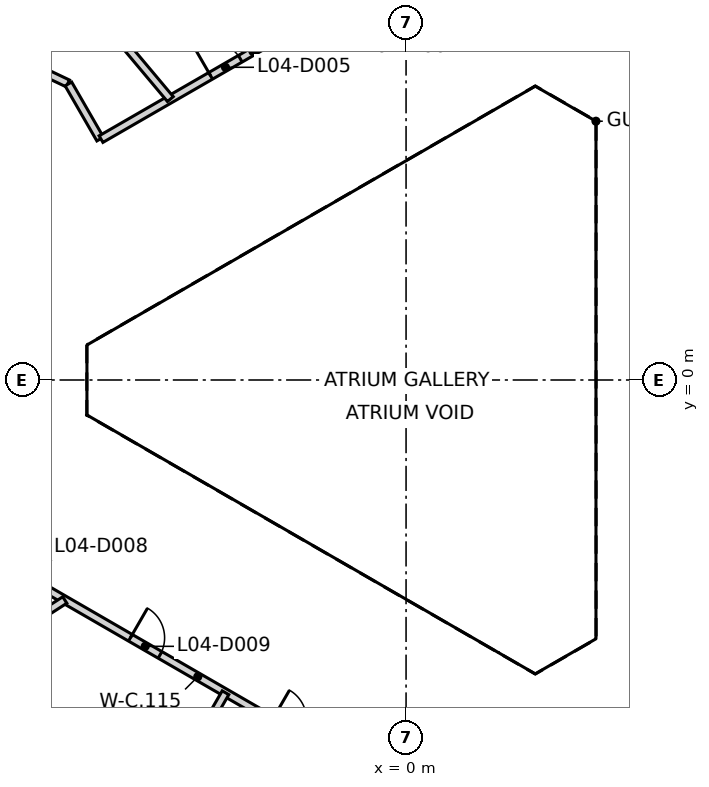
"""IFC4 building model, lengths in metres.
Left out: names, types, materials, properties, quantities, classifications, styles, units other than length and angle.
Written with IfcOpenShell. Run it as: python <this file> out.ifc"""

import sys

from ifc_helpers import new_model, si_unit, direction, frame, frame_2d, origin, place, context, subcontext, project, spatial, rectangle, extrude, element, fill, save


model = new_model("IFC4")
c1 = context("Model", 3, precision=1e-05, world=origin(), true_north=direction((0.0, 1.0)))
c2 = subcontext(c1, "Body", "Model", "MODEL_VIEW")
j1 = project(units=[si_unit("LENGTHUNIT", "METRE"), si_unit("PLANEANGLEUNIT", "RADIAN")], contexts=[c1])
p1 = place(None, origin())
s1 = spatial("IfcSite", under=j1, at=p1, CompositionType="ELEMENT")
p2 = place(p1, origin())
s2 = spatial("IfcBuilding", under=s1, at=p2, CompositionType="ELEMENT")
p3 = place(p2, frame((0.0, 0.0, 24.5)))
s3 = spatial("IfcBuildingStorey", under=s2, at=p3, CompositionType="ELEMENT", Elevation=24.5)
p4 = place(p3, frame((10.42, 6.498, 0.0), z_axis=(0.0, 0.0, 1.0), x_axis=(-0.866021906294, 0.500006057782, 0.0)))
e1 = element("IfcWall", 1, at=p4, inside=s3, PredefinedType="SHEAR", context=c2, shape_type="SweptSolid", body=[
    extrude(rectangle(XDim=11.55, YDim=0.25, at=frame_2d((5.775, 0.0))), origin(), (0.0, 0.0, 1.0), 4.6),
])
p5 = place(p4, frame((10.025, 0.0, 0.0)))
e2 = element("IfcOpeningElement", 2, at=p5, cuts=e1, PredefinedType="OPENING", context=c2, shape_type="SweptSolid", body=[
    extrude(rectangle(XDim=1.2, YDim=2.1, at=frame_2d((0.6, 1.05))), frame((0.0, 0.135, 0.0), z_axis=(0.0, -1.0, 0.0), x_axis=(1.0, 0.0, 0.0)), (0.0, 0.0, 1.0), 0.27),
])
p6 = place(p4, frame((8.725, 0.0, 0.0)))
e3 = element("IfcOpeningElement", 3, at=p6, cuts=e1, PredefinedType="OPENING", context=c2, shape_type="SweptSolid", body=[
    extrude(rectangle(XDim=1.2, YDim=2.1, at=frame_2d((0.6, 1.05))), frame((0.0, 0.135, 0.0), z_axis=(0.0, -1.0, 0.0), x_axis=(1.0, 0.0, 0.0)), (0.0, 0.0, 1.0), 0.27),
])
p7 = place(p3, frame((0.417, -12.273, 0.0), z_axis=(0.0, 0.0, 1.0), x_axis=(0.866021906294, 0.500006057782, 0.0)))
e4 = element("IfcWall", 4, at=p7, inside=s3, PredefinedType="SHEAR", context=c2, shape_type="SweptSolid", body=[
    extrude(rectangle(XDim=11.55, YDim=0.25, at=frame_2d((5.775, 0.0))), origin(), (0.0, 0.0, 1.0), 4.6),
])
p8 = place(p7, frame((10.025, 0.0, 0.0)))
e5 = element("IfcOpeningElement", 5, at=p8, cuts=e4, PredefinedType="OPENING", context=c2, shape_type="SweptSolid", body=[
    extrude(rectangle(XDim=1.2, YDim=2.1, at=frame_2d((0.6, 1.05))), frame((0.0, 0.135, 0.0), z_axis=(0.0, -1.0, 0.0), x_axis=(1.0, 0.0, 0.0)), (0.0, 0.0, 1.0), 0.27),
])
p9 = place(p7, frame((8.725, 0.0, 0.0)))
e6 = element("IfcOpeningElement", 6, at=p9, cuts=e4, PredefinedType="OPENING", context=c2, shape_type="SweptSolid", body=[
    extrude(rectangle(XDim=1.2, YDim=2.1, at=frame_2d((0.6, 1.05))), frame((0.0, 0.135, 0.0), z_axis=(0.0, -1.0, 0.0), x_axis=(1.0, 0.0, 0.0)), (0.0, 0.0, 1.0), 0.27),
])
p10 = place(p3, frame((-10.083, 8.365, 0.0), z_axis=(0.0, 0.0, 1.0), x_axis=(0.903403797446, -0.428790833344, 0.0)))
e7 = element("IfcWall", 7, at=p10, inside=s3, PredefinedType="PARTITIONING", context=c2, shape_type="SweptSolid", body=[
    extrude(rectangle(XDim=1.311, YDim=0.2, at=frame_2d((0.655, 0.0))), origin(), (0.0, 0.0, 1.0), 4.6),
])
p11 = place(p3, frame((-9.463, -5.506, 0.0), z_axis=(0.0, 0.0, 1.0), x_axis=(0.865865073245, -0.500277597875, 0.0)))
e8 = element("IfcWall", 8, at=p11, inside=s3, PredefinedType="PARTITIONING", context=c2, shape_type="SweptSolid", body=[
    extrude(rectangle(XDim=9.199, YDim=0.2, at=frame_2d((4.6, 0.0))), origin(), (0.0, 0.0, 1.0), 4.6),
])
p12 = place(p11, frame((2.552, 0.0, 0.0)))
e9 = element("IfcOpeningElement", 9, at=p12, cuts=e8, PredefinedType="OPENING", context=c2, shape_type="SweptSolid", body=[
    extrude(rectangle(XDim=0.9, YDim=2.1, at=frame_2d((0.45, 1.05))), frame((0.0, 0.11, 0.0), z_axis=(0.0, -1.0, 0.0), x_axis=(1.0, 0.0, 0.0)), (0.0, 0.0, 1.0), 0.22),
])
p13 = place(p11, frame((6.866, 0.0, 0.0)))
e10 = element("IfcOpeningElement", 10, at=p13, cuts=e8, PredefinedType="OPENING", context=c2, shape_type="SweptSolid", body=[
    extrude(rectangle(XDim=0.9, YDim=2.1, at=frame_2d((0.45, 1.05))), frame((0.0, 0.11, 0.0), z_axis=(0.0, -1.0, 0.0), x_axis=(1.0, 0.0, 0.0)), (0.0, 0.0, 1.0), 0.22),
])
p14 = place(p3, frame((-8.885, 7.79, 0.0), z_axis=(0.0, 0.0, 1.0), x_axis=(0.499465657992, -0.86633368657, 0.0)))
e11 = element("IfcWall", 11, at=p14, inside=s3, PredefinedType="PARTITIONING", context=c2, shape_type="SweptSolid", body=[
    extrude(rectangle(XDim=1.674, YDim=0.2, at=frame_2d((0.837, 0.0))), origin(), (0.0, 0.0, 1.0), 4.6),
])
p15 = place(p3, frame((-8.026, 6.338, 0.0), z_axis=(0.0, 0.0, 1.0), x_axis=(0.866102328946, 0.499866738036, 0.0)))
e12 = element("IfcWall", 12, at=p15, inside=s3, PredefinedType="PARTITIONING", context=c2, shape_type="SweptSolid", body=[
    extrude(rectangle(XDim=9.228, YDim=0.2, at=frame_2d((4.614, 0.0))), origin(), (0.0, 0.0, 1.0), 4.6),
])
p16 = place(p15, frame((6.56, 0.0, 0.0)))
e13 = element("IfcOpeningElement", 13, at=p16, cuts=e12, PredefinedType="OPENING", context=c2, shape_type="SweptSolid", body=[
    extrude(rectangle(XDim=1.0, YDim=2.1, at=frame_2d((0.5, 1.05))), frame((0.0, 0.11, 0.0), z_axis=(0.0, -1.0, 0.0), x_axis=(1.0, 0.0, 0.0)), (0.0, 0.0, 1.0), 0.22),
])
p17 = place(p15, frame((3.331, 0.0, 0.0)))
e14 = element("IfcOpeningElement", 14, at=p17, cuts=e12, PredefinedType="OPENING", context=c2, shape_type="SweptSolid", body=[
    extrude(rectangle(XDim=0.9, YDim=2.1, at=frame_2d((0.45, 1.05))), frame((0.0, 0.11, 0.0), z_axis=(0.0, -1.0, 0.0), x_axis=(1.0, 0.0, 0.0)), (0.0, 0.0, 1.0), 0.22),
])
p18 = place(p3, frame((-25.509, -16.444, 0.0), z_axis=(0.0, 0.0, 1.0), x_axis=(0.840502189504, 0.541808148184, 0.0)))
e15 = element("IfcWall", 15, at=p18, inside=s3, PredefinedType="PARTITIONING", context=c2, shape_type="SweptSolid", body=[
    extrude(rectangle(XDim=19.666, YDim=0.2, at=frame_2d((9.833, 0.0))), origin(), (0.0, 0.0, 1.0), 4.6),
])
p19 = place(p3, frame((-17.62, 20.998, 0.0), z_axis=(0.0, 0.0, 1.0), x_axis=(0.642810047669, -0.766025614856, 0.0)))
e16 = element("IfcWall", 16, at=p19, inside=s3, PredefinedType="PARTITIONING", context=c2, shape_type="SweptSolid", body=[
    extrude(rectangle(XDim=17.763, YDim=0.2, at=frame_2d((8.882, 0.0))), origin(), (0.0, 0.0, 1.0), 4.6),
])
p20 = place(p3, frame((-13.498, -23.378, 0.0), z_axis=(0.0, 0.0, 1.0), x_axis=(0.500002732974, 0.866023825895, 0.0)))
e17 = element("IfcWall", 17, at=p20, inside=s3, PredefinedType="PARTITIONING", context=c2, shape_type="SweptSolid", body=[
    extrude(rectangle(XDim=17.493, YDim=0.2, at=frame_2d((8.747, 0.0))), origin(), (0.0, 0.0, 1.0), 4.6),
])
p21 = place(p17, origin())
e18 = element("IfcDoor", 18, at=p21, inside=s3, OperationType="SINGLE_SWING_LEFT", PredefinedType="DOOR", context=c2, shape_type="SweptSolid", body=[
    extrude(rectangle(XDim=0.9, YDim=2.1, at=frame_2d((0.45, 1.05))), frame((0.0, 0.025, 0.0), z_axis=(0.0, -1.0, 0.0), x_axis=(1.0, 0.0, 0.0)), (0.0, 0.0, 1.0), 0.05),
])
fill(e14, e18)
p22 = place(p12, frame((0.9, 0.0, 0.0), z_axis=(0.0, 0.0, 1.0), x_axis=(-1.0, 0.0, 0.0)))
e19 = element("IfcDoor", 19, at=p22, inside=s3, OperationType="SINGLE_SWING_LEFT", PredefinedType="DOOR", context=c2, shape_type="SweptSolid", body=[
    extrude(rectangle(XDim=0.9, YDim=2.1, at=frame_2d((0.45, 1.05))), frame((0.0, 0.025, 0.0), z_axis=(0.0, -1.0, 0.0), x_axis=(1.0, 0.0, 0.0)), (0.0, 0.0, 1.0), 0.05),
])
fill(e9, e19)
save(model, sys.argv[1])
